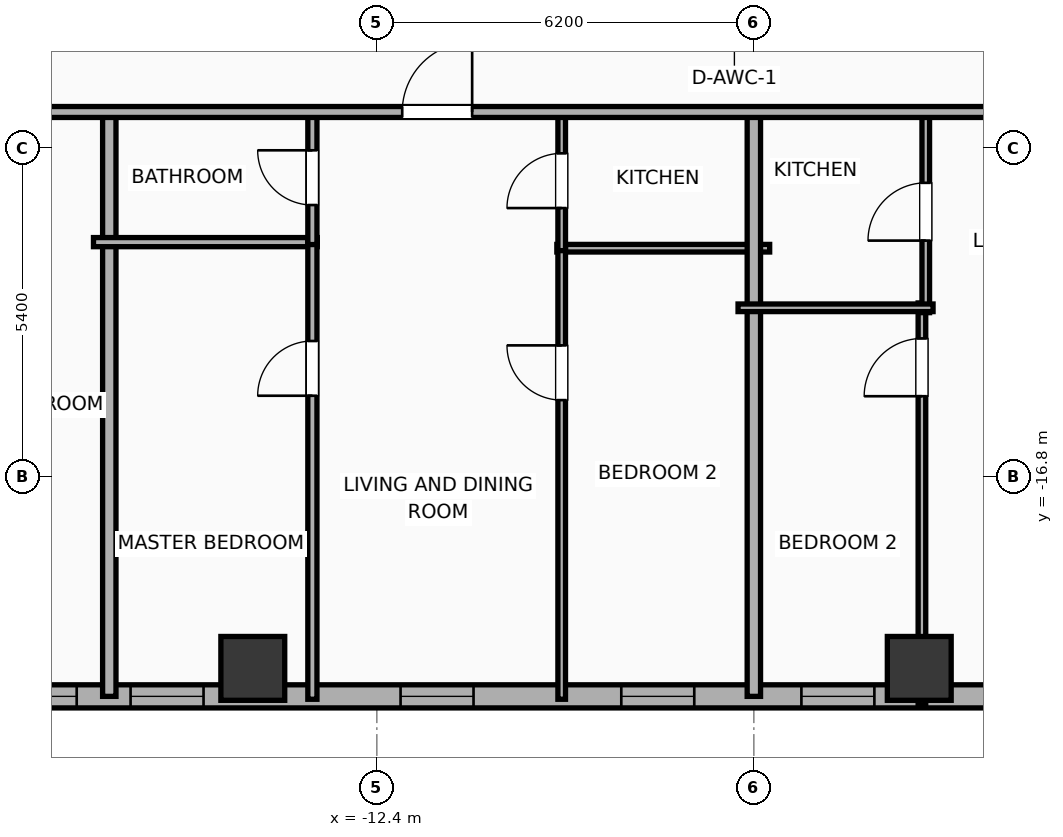
"""IFC4 building model, lengths in metres.
Left out: names, types, materials, properties, quantities, classifications, styles, units other than length and angle.
Written with IfcOpenShell. Run it as: python <this file> out.ifc"""

import sys

from ifc_helpers import new_model, si_unit, direction, frame, frame_2d, origin, origin_2d, place, context, subcontext, project, spatial, rectangle, hollow_rectangle, extrude, element, fill, save


model = new_model("IFC4")
c1 = context("Model", 3, precision=1e-05, world=origin(), true_north=direction((0.0, 1.0)))
c2 = subcontext(c1, "Body", "Model", "MODEL_VIEW")
j1 = project(units=[si_unit("LENGTHUNIT", "METRE"), si_unit("PLANEANGLEUNIT", "RADIAN")], contexts=[c1])
p1 = place(None, origin())
s1 = spatial("IfcSite", under=j1, at=p1, CompositionType="ELEMENT")
p2 = place(p1, origin())
s2 = spatial("IfcBuilding", under=s1, at=p2, CompositionType="ELEMENT")
p3 = place(p2, frame((0.0, 0.0, 109.2)))
s3 = spatial("IfcBuildingStorey", under=s2, at=p3, CompositionType="ELEMENT", Elevation=109.2)
for number, where, z_axis, x_axis in (
    (1, (-14.44, -19.95, 0.0), (0.0, 0.0, 1.0), (1.0, 0.0, 0.0)),
    (2, (-3.48, -19.95, 0.0), (0.0, 0.0, 1.0), (1.0, 0.0, 0.0)),
):
    element("IfcColumn", number, at=place(p3, frame(where, z_axis=z_axis, x_axis=x_axis)), inside=s3, PredefinedType="COLUMN", context=c2, shape_type="SweptSolid", body=[
        extrude(hollow_rectangle(XDim=1.05, YDim=1.05, WallThickness=0.036, at=origin_2d()), origin(), (0.0, 0.0, 1.0), 3.9),
    ])
p4 = place(p3, frame((29.381, -20.41, 0.0), z_axis=(0.0, 0.0, 1.0), x_axis=(-1.0, 0.0, 0.0)))
e3 = element("IfcWall", 3, at=p4, inside=s3, PredefinedType="ELEMENTEDWALL", context=c2, shape_type="SweptSolid", body=[
    extrude(rectangle(XDim=54.763, YDim=0.38, at=frame_2d((27.381, 0.0))), origin(), (0.0, 0.0, 1.0), 3.65),
])
p5 = place(p4, frame((3.995, 0.0, 0.75)))
e4 = element("IfcOpeningElement", 4, at=p5, cuts=e3, PredefinedType="OPENING", context=c2, shape_type="SweptSolid", body=[
    extrude(rectangle(XDim=2.4, YDim=2.1, at=frame_2d((1.2, 1.05))), frame((0.0, 0.2, 0.0), z_axis=(0.0, -1.0, 0.0), x_axis=(1.0, 0.0, 0.0)), (0.0, 0.0, 1.0), 0.4),
])
p6 = place(p4, frame((18.486, 0.0, 0.75)))
e5 = element("IfcOpeningElement", 5, at=p6, cuts=e3, PredefinedType="OPENING", context=c2, shape_type="SweptSolid", body=[
    extrude(rectangle(XDim=2.4, YDim=2.1, at=frame_2d((1.2, 1.05))), frame((0.0, 0.2, 0.0), z_axis=(0.0, -1.0, 0.0), x_axis=(1.0, 0.0, 0.0)), (0.0, 0.0, 1.0), 0.4),
])
p7 = place(p4, frame((46.717, 0.0, 0.75)))
e6 = element("IfcOpeningElement", 6, at=p7, cuts=e3, PredefinedType="OPENING", context=c2, shape_type="SweptSolid", body=[
    extrude(rectangle(XDim=2.4, YDim=2.1, at=frame_2d((1.2, 1.05))), frame((0.0, 0.2, 0.0), z_axis=(0.0, -1.0, 0.0), x_axis=(1.0, 0.0, 0.0)), (0.0, 0.0, 1.0), 0.4),
])
p8 = place(p4, frame((52.651, 0.0, 0.75)))
e7 = element("IfcOpeningElement", 7, at=p8, cuts=e3, PredefinedType="OPENING", context=c2, shape_type="SweptSolid", body=[
    extrude(rectangle(XDim=1.2, YDim=2.05, at=frame_2d((0.6, 1.025))), frame((0.0, 0.2, 0.0), z_axis=(0.0, -1.0, 0.0), x_axis=(1.0, 0.0, 0.0)), (0.0, 0.0, 1.0), 0.4),
])
p9 = place(p4, frame((50.521, 0.0, 0.75)))
e8 = element("IfcOpeningElement", 8, at=p9, cuts=e3, PredefinedType="OPENING", context=c2, shape_type="SweptSolid", body=[
    extrude(rectangle(XDim=1.2, YDim=2.05, at=frame_2d((0.6, 1.025))), frame((0.0, 0.2, 0.0), z_axis=(0.0, -1.0, 0.0), x_axis=(1.0, 0.0, 0.0)), (0.0, 0.0, 1.0), 0.4),
])
p10 = place(p4, frame((40.191, 0.0, 0.75)))
e9 = element("IfcOpeningElement", 9, at=p10, cuts=e3, PredefinedType="OPENING", context=c2, shape_type="SweptSolid", body=[
    extrude(rectangle(XDim=1.2, YDim=2.05, at=frame_2d((0.6, 1.025))), frame((0.0, 0.2, 0.0), z_axis=(0.0, -1.0, 0.0), x_axis=(1.0, 0.0, 0.0)), (0.0, 0.0, 1.0), 0.4),
])
p11 = place(p4, frame((44.631, 0.0, 0.75)))
e10 = element("IfcOpeningElement", 10, at=p11, cuts=e3, PredefinedType="OPENING", context=c2, shape_type="SweptSolid", body=[
    extrude(rectangle(XDim=1.2, YDim=2.05, at=frame_2d((0.6, 1.025))), frame((0.0, 0.2, 0.0), z_axis=(0.0, -1.0, 0.0), x_axis=(1.0, 0.0, 0.0)), (0.0, 0.0, 1.0), 0.4),
])
p12 = place(p4, frame((36.561, 0.0, 0.75)))
e11 = element("IfcOpeningElement", 11, at=p12, cuts=e3, PredefinedType="OPENING", context=c2, shape_type="SweptSolid", body=[
    extrude(rectangle(XDim=1.2, YDim=2.05, at=frame_2d((0.6, 1.025))), frame((0.0, 0.2, 0.0), z_axis=(0.0, -1.0, 0.0), x_axis=(1.0, 0.0, 0.0)), (0.0, 0.0, 1.0), 0.4),
])
p13 = place(p4, frame((30.004, 0.0, 0.75)))
e12 = element("IfcOpeningElement", 12, at=p13, cuts=e3, PredefinedType="OPENING", context=c2, shape_type="SweptSolid", body=[
    extrude(rectangle(XDim=1.2, YDim=2.05, at=frame_2d((0.6, 1.025))), frame((0.0, 0.2, 0.0), z_axis=(0.0, -1.0, 0.0), x_axis=(1.0, 0.0, 0.0)), (0.0, 0.0, 1.0), 0.4),
])
p14 = place(p4, frame((33.599, 0.0, 0.75)))
e13 = element("IfcOpeningElement", 13, at=p14, cuts=e3, PredefinedType="OPENING", context=c2, shape_type="SweptSolid", body=[
    extrude(rectangle(XDim=1.2, YDim=2.05, at=frame_2d((0.6, 1.025))), frame((0.0, 0.2, 0.0), z_axis=(0.0, -1.0, 0.0), x_axis=(1.0, 0.0, 0.0)), (0.0, 0.0, 1.0), 0.4),
])
p15 = place(p4, frame((26.086, 0.0, 0.75)))
e14 = element("IfcOpeningElement", 14, at=p15, cuts=e3, PredefinedType="OPENING", context=c2, shape_type="SweptSolid", body=[
    extrude(rectangle(XDim=1.2, YDim=2.05, at=frame_2d((0.6, 1.025))), frame((0.0, 0.2, 0.0), z_axis=(0.0, -1.0, 0.0), x_axis=(1.0, 0.0, 0.0)), (0.0, 0.0, 1.0), 0.4),
])
p16 = place(p4, frame((22.626, 0.0, 0.75)))
e15 = element("IfcOpeningElement", 15, at=p16, cuts=e3, PredefinedType="OPENING", context=c2, shape_type="SweptSolid", body=[
    extrude(rectangle(XDim=1.2, YDim=2.05, at=frame_2d((0.6, 1.025))), frame((0.0, 0.2, 0.0), z_axis=(0.0, -1.0, 0.0), x_axis=(1.0, 0.0, 0.0)), (0.0, 0.0, 1.0), 0.4),
])
p17 = place(p4, frame((15.361, 0.0, 0.75)))
e16 = element("IfcOpeningElement", 16, at=p17, cuts=e3, PredefinedType="OPENING", context=c2, shape_type="SweptSolid", body=[
    extrude(rectangle(XDim=1.2, YDim=2.05, at=frame_2d((0.6, 1.025))), frame((0.0, 0.2, 0.0), z_axis=(0.0, -1.0, 0.0), x_axis=(1.0, 0.0, 0.0)), (0.0, 0.0, 1.0), 0.4),
])
p18 = place(p4, frame((8.986, 0.0, 0.75)))
e17 = element("IfcOpeningElement", 17, at=p18, cuts=e3, PredefinedType="OPENING", context=c2, shape_type="SweptSolid", body=[
    extrude(rectangle(XDim=1.2, YDim=2.05, at=frame_2d((0.6, 1.025))), frame((0.0, 0.2, 0.0), z_axis=(0.0, -1.0, 0.0), x_axis=(1.0, 0.0, 0.0)), (0.0, 0.0, 1.0), 0.4),
])
p19 = place(p4, frame((1.736, 0.0, 0.75)))
e18 = element("IfcOpeningElement", 18, at=p19, cuts=e3, PredefinedType="OPENING", context=c2, shape_type="SweptSolid", body=[
    extrude(rectangle(XDim=1.2, YDim=2.05, at=frame_2d((0.6, 1.025))), frame((0.0, 0.2, 0.0), z_axis=(0.0, -1.0, 0.0), x_axis=(1.0, 0.0, 0.0)), (0.0, 0.0, 1.0), 0.4),
])
p20 = place(p3, frame((-16.8, -20.41, 0.0), z_axis=(0.0, 0.0, 1.0), x_axis=(0.0, 1.0, 0.0)))
e19 = element("IfcWall", 19, at=p20, inside=s3, PredefinedType="PARTITIONING", context=c2, shape_type="SweptSolid", body=[
    extrude(rectangle(XDim=9.69, YDim=0.22, at=frame_2d((4.845, 0.0))), origin(), (0.0, 0.0, 1.0), 3.65),
])
p21 = place(p3, frame((-17.06, -12.94, 0.0), z_axis=(0.0, 0.0, 1.0), x_axis=(1.0, 0.0, 0.0)))
e20 = element("IfcWall", 20, at=p21, inside=s3, PredefinedType="PLUMBINGWALL", context=c2, shape_type="SweptSolid", body=[
    extrude(rectangle(XDim=3.68, YDim=0.15, at=frame_2d((1.84, 0.0))), origin(), (0.0, 0.0, 1.0), 3.65),
])
p22 = place(p3, frame((-9.44, -13.04, 0.0), z_axis=(0.0, 0.0, 1.0), x_axis=(1.0, 0.0, 0.0)))
e21 = element("IfcWall", 21, at=p22, inside=s3, PredefinedType="PARTITIONING", context=c2, shape_type="SweptSolid", body=[
    extrude(rectangle(XDim=3.5, YDim=0.125, at=frame_2d((1.75, 0.0))), origin(), (0.0, 0.0, 1.0), 3.65),
])
p23 = place(p3, frame((-13.46, -20.458, 0.0), z_axis=(0.0, 0.0, 1.0), x_axis=(0.0, 1.0, 0.0)))
e22 = element("IfcWall", 22, at=p23, inside=s3, PredefinedType="PLUMBINGWALL", context=c2, shape_type="SweptSolid", body=[
    extrude(rectangle(XDim=7.558, YDim=0.15, at=frame_2d((3.779, 0.0))), origin(), (0.0, 0.0, 1.0), 3.65),
])
p24 = place(p23, frame((4.991, 0.0, 0.0)))
e23 = element("IfcOpeningElement", 23, at=p24, cuts=e22, PredefinedType="OPENING", context=c2, shape_type="SweptSolid", body=[
    extrude(rectangle(XDim=0.9, YDim=2.05, at=frame_2d((0.45, 1.025))), frame((0.0, 0.085, 0.0), z_axis=(0.0, -1.0, 0.0), x_axis=(1.0, 0.0, 0.0)), (0.0, 0.0, 1.0), 0.17),
])
p25 = place(p3, frame((-13.46, -12.98, 0.0), z_axis=(0.0, 0.0, 1.0), x_axis=(0.0, 1.0, 0.0)))
e24 = element("IfcWall", 24, at=p25, inside=s3, PredefinedType="PLUMBINGWALL", context=c2, shape_type="SweptSolid", body=[
    extrude(rectangle(XDim=2.2, YDim=0.15, at=frame_2d((1.1, 0.0))), origin(), (0.0, 0.0, 1.0), 3.65),
])
p26 = place(p25, frame((0.65, 0.0, 0.0)))
e25 = element("IfcOpeningElement", 25, at=p26, cuts=e24, PredefinedType="OPENING", context=c2, shape_type="SweptSolid", body=[
    extrude(rectangle(XDim=0.9, YDim=2.05, at=frame_2d((0.45, 1.025))), frame((0.0, 0.085, 0.0), z_axis=(0.0, -1.0, 0.0), x_axis=(1.0, 0.0, 0.0)), (0.0, 0.0, 1.0), 0.17),
])
p27 = place(p3, frame((-9.36, -20.458, 0.0), z_axis=(0.0, 0.0, 1.0), x_axis=(0.0, 1.0, 0.0)))
e26 = element("IfcWall", 26, at=p27, inside=s3, PredefinedType="PARTITIONING", context=c2, shape_type="SweptSolid", body=[
    extrude(rectangle(XDim=7.458, YDim=0.125, at=frame_2d((3.729, 0.0))), origin(), (0.0, 0.0, 1.0), 3.65),
])
p28 = place(p27, frame((4.919, 0.0, 0.0)))
e27 = element("IfcOpeningElement", 27, at=p28, cuts=e26, PredefinedType="OPENING", context=c2, shape_type="SweptSolid", body=[
    extrude(rectangle(XDim=0.9, YDim=2.05, at=frame_2d((0.45, 1.025))), frame((0.0, 0.073, 0.0), z_axis=(0.0, -1.0, 0.0), x_axis=(1.0, 0.0, 0.0)), (0.0, 0.0, 1.0), 0.145),
])
p29 = place(p3, frame((-9.36, -13.08, 0.0), z_axis=(0.0, 0.0, 1.0), x_axis=(0.0, 1.0, 0.0)))
e28 = element("IfcWall", 28, at=p29, inside=s3, PredefinedType="PARTITIONING", context=c2, shape_type="SweptSolid", body=[
    extrude(rectangle(XDim=2.3, YDim=0.125, at=frame_2d((1.15, 0.0))), origin(), (0.0, 0.0, 1.0), 3.65),
])
p30 = place(p29, frame((0.7, 0.0, 0.0)))
e29 = element("IfcOpeningElement", 29, at=p30, cuts=e28, PredefinedType="OPENING", context=c2, shape_type="SweptSolid", body=[
    extrude(rectangle(XDim=0.9, YDim=2.05, at=frame_2d((0.45, 1.025))), frame((0.0, 0.073, 0.0), z_axis=(0.0, -1.0, 0.0), x_axis=(1.0, 0.0, 0.0)), (0.0, 0.0, 1.0), 0.145),
])
p31 = place(p3, frame((-6.2, -20.41, 0.0), z_axis=(0.0, 0.0, 1.0), x_axis=(0.0, 1.0, 0.0)))
e30 = element("IfcWall", 30, at=p31, inside=s3, PredefinedType="PARTITIONING", context=c2, shape_type="SweptSolid", body=[
    extrude(rectangle(XDim=9.69, YDim=0.22, at=frame_2d((4.845, 0.0))), origin(), (0.0, 0.0, 1.0), 3.65),
])
p32 = place(p3, frame((-3.436, -20.56, 0.0), z_axis=(0.0, 0.0, 1.0), x_axis=(0.0, 1.0, 0.0)))
e31 = element("IfcWall", 31, at=p32, inside=s3, PredefinedType="PARTITIONING", context=c2, shape_type="SweptSolid", body=[
    extrude(rectangle(XDim=6.62, YDim=0.125, at=frame_2d((3.31, 0.0))), origin(), (0.0, 0.0, 1.0), 3.04),
])
p33 = place(p32, frame((5.086, 0.0, 0.0)))
e32 = element("IfcOpeningElement", 32, at=p33, cuts=e31, PredefinedType="OPENING", context=c2, shape_type="SweptSolid", body=[
    extrude(rectangle(XDim=0.95, YDim=2.05, at=frame_2d((0.475, 1.025))), frame((0.0, 0.073, 0.0), z_axis=(0.0, -1.0, 0.0), x_axis=(1.0, 0.0, 0.0)), (0.0, 0.0, 1.0), 0.145),
])
p34 = place(p3, frame((-3.373, -14.1, 0.0), z_axis=(0.0, 0.0, 1.0), x_axis=(0.0, 1.0, 0.0)))
e33 = element("IfcWall", 33, at=p34, inside=s3, PredefinedType="PARTITIONING", context=c2, shape_type="SweptSolid", body=[
    extrude(rectangle(XDim=3.32, YDim=0.125, at=frame_2d((1.66, 0.0))), origin(), (0.0, 0.0, 1.0), 3.65),
])
p35 = place(p34, frame((1.185, 0.0, 0.0)))
e34 = element("IfcOpeningElement", 34, at=p35, cuts=e33, PredefinedType="OPENING", context=c2, shape_type="SweptSolid", body=[
    extrude(rectangle(XDim=0.95, YDim=2.05, at=frame_2d((0.475, 1.025))), frame((0.0, 0.073, 0.0), z_axis=(0.0, -1.0, 0.0), x_axis=(1.0, 0.0, 0.0)), (0.0, 0.0, 1.0), 0.145),
])
p36 = place(p3, frame((-6.46, -14.02, 0.0), z_axis=(0.0, 0.0, 1.0), x_axis=(1.0, 0.0, 0.0)))
e35 = element("IfcWall", 35, at=p36, inside=s3, PredefinedType="PARTITIONING", context=c2, shape_type="SweptSolid", body=[
    extrude(rectangle(XDim=3.207, YDim=0.125, at=frame_2d((1.604, 0.0))), origin(), (0.0, 0.0, 1.0), 3.65),
])
p37 = place(p3, frame((-29.21, -10.8, 0.0), z_axis=(0.0, 0.0, 1.0), x_axis=(1.0, 0.0, 0.0)))
e36 = element("IfcWall", 36, at=p37, inside=s3, PredefinedType="PARTITIONING", context=c2, shape_type="SweptSolid", body=[
    extrude(rectangle(XDim=62.42, YDim=0.18, at=frame_2d((31.21, 0.0))), origin(), (0.0, 0.0, 1.0), 3.65),
])
p38 = place(p37, frame((2.74, 0.0, 0.0)))
e37 = element("IfcOpeningElement", 37, at=p38, cuts=e36, PredefinedType="OPENING", context=c2, shape_type="SweptSolid", body=[
    extrude(rectangle(XDim=0.9, YDim=2.05, at=frame_2d((0.45, 1.025))), frame((0.0, 0.1, 0.0), z_axis=(0.0, -1.0, 0.0), x_axis=(1.0, 0.0, 0.0)), (0.0, 0.0, 1.0), 0.2),
])
p39 = place(p37, frame((9.968, 0.0, 0.0)))
e38 = element("IfcOpeningElement", 38, at=p39, cuts=e36, PredefinedType="OPENING", context=c2, shape_type="SweptSolid", body=[
    extrude(rectangle(XDim=1.15, YDim=2.05, at=frame_2d((0.575, 1.025))), frame((0.0, 0.1, 0.0), z_axis=(0.0, -1.0, 0.0), x_axis=(1.0, 0.0, 0.0)), (0.0, 0.0, 1.0), 0.2),
])
p40 = place(p37, frame((17.227, 0.0, 0.0)))
e39 = element("IfcOpeningElement", 39, at=p40, cuts=e36, PredefinedType="OPENING", context=c2, shape_type="SweptSolid", body=[
    extrude(rectangle(XDim=1.15, YDim=2.05, at=frame_2d((0.575, 1.025))), frame((0.0, 0.1, 0.0), z_axis=(0.0, -1.0, 0.0), x_axis=(1.0, 0.0, 0.0)), (0.0, 0.0, 1.0), 0.2),
])
p41 = place(p37, frame((28.157, 0.0, 0.0)))
e40 = element("IfcOpeningElement", 40, at=p41, cuts=e36, PredefinedType="OPENING", context=c2, shape_type="SweptSolid", body=[
    extrude(rectangle(XDim=1.15, YDim=2.05, at=frame_2d((0.575, 1.025))), frame((0.0, 0.1, 0.0), z_axis=(0.0, -1.0, 0.0), x_axis=(1.0, 0.0, 0.0)), (0.0, 0.0, 1.0), 0.2),
])
p42 = place(p37, frame((38.512, 0.0, 0.0)))
e41 = element("IfcOpeningElement", 41, at=p42, cuts=e36, PredefinedType="OPENING", context=c2, shape_type="SweptSolid", body=[
    extrude(rectangle(XDim=1.15, YDim=2.05, at=frame_2d((0.575, 1.025))), frame((0.0, 0.1, 0.0), z_axis=(0.0, -1.0, 0.0), x_axis=(1.0, 0.0, 0.0)), (0.0, 0.0, 1.0), 0.2),
])
p43 = place(p37, frame((49.33, 0.0, 0.0)))
e42 = element("IfcOpeningElement", 42, at=p43, cuts=e36, PredefinedType="OPENING", context=c2, shape_type="SweptSolid", body=[
    extrude(rectangle(XDim=1.15, YDim=2.05, at=frame_2d((0.575, 1.025))), frame((0.0, 0.1, 0.0), z_axis=(0.0, -1.0, 0.0), x_axis=(1.0, 0.0, 0.0)), (0.0, 0.0, 1.0), 0.2),
])
p44 = place(p37, frame((58.237, 0.0, 0.0)))
e43 = element("IfcOpeningElement", 43, at=p44, cuts=e36, PredefinedType="OPENING", context=c2, shape_type="SweptSolid", body=[
    extrude(rectangle(XDim=1.15, YDim=2.05, at=frame_2d((0.575, 1.025))), frame((0.0, 0.1, 0.0), z_axis=(0.0, -1.0, 0.0), x_axis=(1.0, 0.0, 0.0)), (0.0, 0.0, 1.0), 0.2),
])
p45 = place(p7, origin())
e44 = element("IfcWindow", 44, at=p45, inside=s3, PartitioningType="SINGLE_PANEL", PredefinedType="WINDOW", context=c2, shape_type="SweptSolid", body=[
    extrude(rectangle(XDim=2.4, YDim=2.1, at=frame_2d((1.2, 1.05))), frame((0.0, 0.03, 0.0), z_axis=(0.0, -1.0, 0.0), x_axis=(1.0, 0.0, 0.0)), (0.0, 0.0, 1.0), 0.06),
])
fill(e6, e44)
p46 = place(p10, origin())
e45 = element("IfcWindow", 45, at=p46, inside=s3, PartitioningType="SINGLE_PANEL", PredefinedType="WINDOW", context=c2, shape_type="SweptSolid", body=[
    extrude(rectangle(XDim=1.2, YDim=2.05, at=frame_2d((0.6, 1.025))), frame((0.0, 0.03, 0.0), z_axis=(0.0, -1.0, 0.0), x_axis=(1.0, 0.0, 0.0)), (0.0, 0.0, 1.0), 0.06),
])
fill(e9, e45)
p47 = place(p11, origin())
e46 = element("IfcWindow", 46, at=p47, inside=s3, PartitioningType="SINGLE_PANEL", PredefinedType="WINDOW", context=c2, shape_type="SweptSolid", body=[
    extrude(rectangle(XDim=1.2, YDim=2.05, at=frame_2d((0.6, 1.025))), frame((0.0, 0.03, 0.0), z_axis=(0.0, -1.0, 0.0), x_axis=(1.0, 0.0, 0.0)), (0.0, 0.0, 1.0), 0.06),
])
fill(e10, e46)
p48 = place(p12, origin())
e47 = element("IfcWindow", 47, at=p48, inside=s3, PartitioningType="SINGLE_PANEL", PredefinedType="WINDOW", context=c2, shape_type="SweptSolid", body=[
    extrude(rectangle(XDim=1.2, YDim=2.05, at=frame_2d((0.6, 1.025))), frame((0.0, 0.03, 0.0), z_axis=(0.0, -1.0, 0.0), x_axis=(1.0, 0.0, 0.0)), (0.0, 0.0, 1.0), 0.06),
])
fill(e11, e47)
p49 = place(p14, origin())
e48 = element("IfcWindow", 48, at=p49, inside=s3, PartitioningType="SINGLE_PANEL", PredefinedType="WINDOW", context=c2, shape_type="SweptSolid", body=[
    extrude(rectangle(XDim=1.2, YDim=2.05, at=frame_2d((0.6, 1.025))), frame((0.0, 0.03, 0.0), z_axis=(0.0, -1.0, 0.0), x_axis=(1.0, 0.0, 0.0)), (0.0, 0.0, 1.0), 0.06),
])
fill(e13, e48)
p50 = place(p24, origin())
e49 = element("IfcDoor", 49, at=p50, inside=s3, OperationType="SINGLE_SWING_LEFT", PredefinedType="DOOR", context=c2, shape_type="SweptSolid", body=[
    extrude(rectangle(XDim=0.9, YDim=2.05, at=frame_2d((0.45, 1.025))), frame((0.0, 0.025, 0.0), z_axis=(0.0, -1.0, 0.0), x_axis=(1.0, 0.0, 0.0)), (0.0, 0.0, 1.0), 0.05),
])
fill(e23, e49)
p51 = place(p26, origin())
e50 = element("IfcDoor", 50, at=p51, inside=s3, OperationType="SINGLE_SWING_RIGHT", PredefinedType="DOOR", context=c2, shape_type="SweptSolid", body=[
    extrude(rectangle(XDim=0.9, YDim=2.05, at=frame_2d((0.45, 1.025))), frame((0.0, 0.025, 0.0), z_axis=(0.0, -1.0, 0.0), x_axis=(1.0, 0.0, 0.0)), (0.0, 0.0, 1.0), 0.05),
])
fill(e25, e50)
p52 = place(p28, origin())
e51 = element("IfcDoor", 51, at=p52, inside=s3, OperationType="SINGLE_SWING_RIGHT", PredefinedType="DOOR", context=c2, shape_type="SweptSolid", body=[
    extrude(rectangle(XDim=0.9, YDim=2.05, at=frame_2d((0.45, 1.025))), frame((0.0, 0.025, 0.0), z_axis=(0.0, -1.0, 0.0), x_axis=(1.0, 0.0, 0.0)), (0.0, 0.0, 1.0), 0.05),
])
fill(e27, e51)
p53 = place(p30, origin())
e52 = element("IfcDoor", 52, at=p53, inside=s3, OperationType="SINGLE_SWING_LEFT", PredefinedType="DOOR", context=c2, shape_type="SweptSolid", body=[
    extrude(rectangle(XDim=0.9, YDim=2.05, at=frame_2d((0.45, 1.025))), frame((0.0, 0.025, 0.0), z_axis=(0.0, -1.0, 0.0), x_axis=(1.0, 0.0, 0.0)), (0.0, 0.0, 1.0), 0.05),
])
fill(e29, e52)
p54 = place(p33, origin())
e53 = element("IfcDoor", 53, at=p54, inside=s3, OperationType="SINGLE_SWING_LEFT", PredefinedType="DOOR", context=c2, shape_type="SweptSolid", body=[
    extrude(rectangle(XDim=0.95, YDim=2.05, at=frame_2d((0.475, 1.025))), frame((0.0, 0.025, 0.0), z_axis=(0.0, -1.0, 0.0), x_axis=(1.0, 0.0, 0.0)), (0.0, 0.0, 1.0), 0.05),
])
fill(e32, e53)
p55 = place(p35, origin())
e54 = element("IfcDoor", 54, at=p55, inside=s3, OperationType="SINGLE_SWING_LEFT", PredefinedType="DOOR", context=c2, shape_type="SweptSolid", body=[
    extrude(rectangle(XDim=0.95, YDim=2.05, at=frame_2d((0.475, 1.025))), frame((0.0, 0.025, 0.0), z_axis=(0.0, -1.0, 0.0), x_axis=(1.0, 0.0, 0.0)), (0.0, 0.0, 1.0), 0.05),
])
fill(e34, e54)
p56 = place(p40, origin())
e55 = element("IfcDoor", 55, at=p56, inside=s3, OperationType="SINGLE_SWING_RIGHT", PredefinedType="DOOR", context=c2, shape_type="SweptSolid", body=[
    extrude(rectangle(XDim=1.15, YDim=2.05, at=frame_2d((0.575, 1.025))), frame((0.0, 0.025, 0.0), z_axis=(0.0, -1.0, 0.0), x_axis=(1.0, 0.0, 0.0)), (0.0, 0.0, 1.0), 0.05),
])
fill(e39, e55)
save(model, sys.argv[1])
